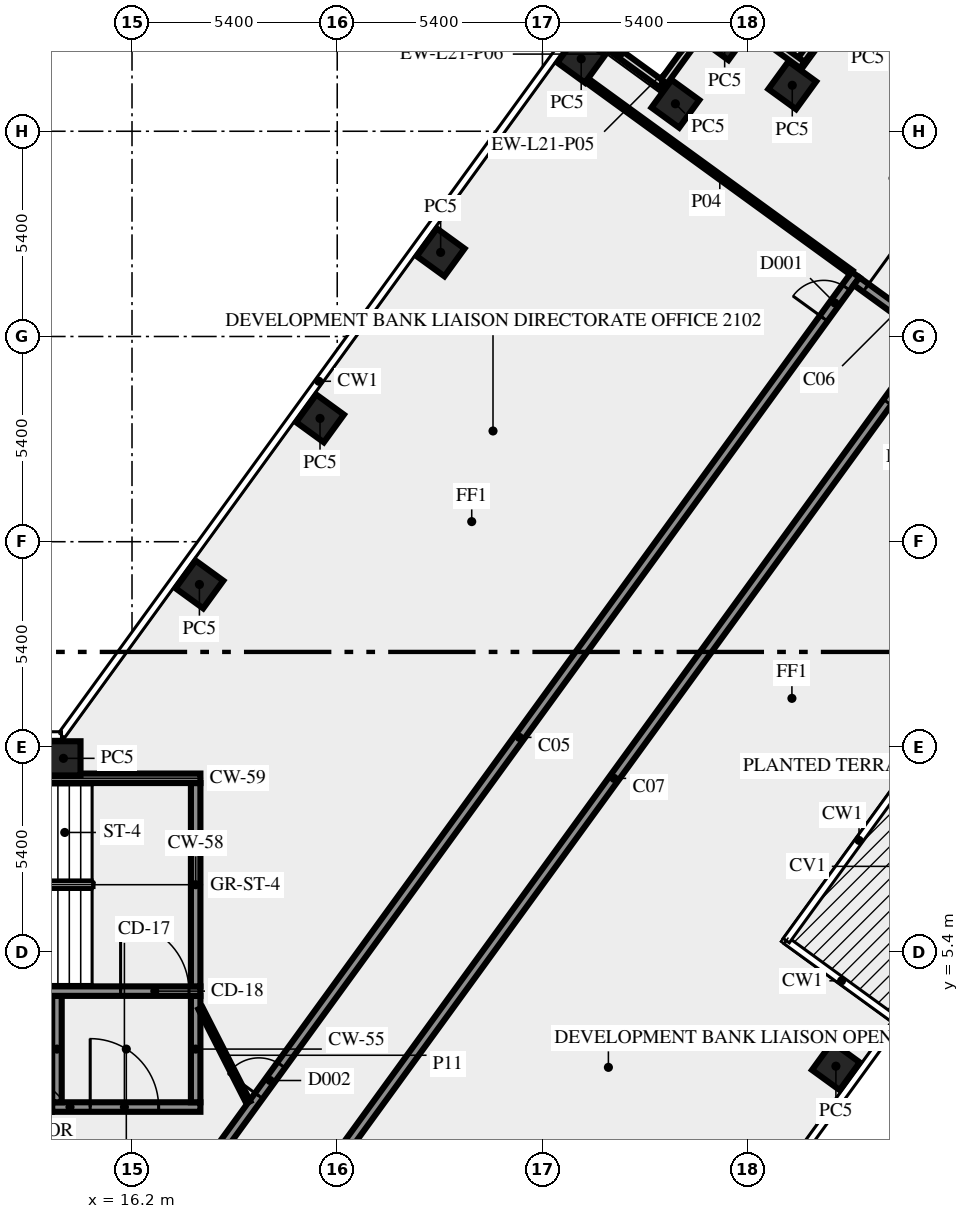
"""IFC4 building model, lengths in metres.
Left out: names, types, materials, properties, quantities, classifications, styles, units other than length and angle.
Written with IfcOpenShell. Run it as: python <this file> out.ifc"""

import sys

from ifc_helpers import new_model, si_unit, direction, frame, frame_2d, origin, origin_2d, place, context, subcontext, project, spatial, rectangle, extrude, element, fill, save


model = new_model("IFC4")
c1 = context("Model", 3, precision=1e-05, world=origin(), true_north=direction((0.0, 1.0)))
c2 = subcontext(c1, "Body", "Model", "MODEL_VIEW")
j1 = project(units=[si_unit("LENGTHUNIT", "METRE"), si_unit("PLANEANGLEUNIT", "RADIAN")], contexts=[c1])
p1 = place(None, origin())
s1 = spatial("IfcSite", under=j1, at=p1, CompositionType="ELEMENT")
p2 = place(p1, origin())
s2 = spatial("IfcBuilding", under=s1, at=p2, CompositionType="ELEMENT")
p3 = place(p2, frame((0.0, 0.0, 93.0)))
s3 = spatial("IfcBuildingStorey", under=s2, at=p3, CompositionType="ELEMENT", Elevation=93.0)
for number, where, z_axis, x_axis in (
    (1, (34.722, 2.4, 0.0), (0.0, 0.0, 1.0), (0.588, 0.809, 0.0)),
    (2, (33.574, 28.209, 0.0), (0.0, 0.0, 1.0), (-0.809, 0.588, 0.0)),
    (3, (31.795, 29.5, 0.0), (0.0, 0.0, 1.0), (-0.588, -0.809, 0.0)),
    (4, (30.499, 27.723, 0.0), (0.0, 0.0, 1.0), (-0.809, 0.588, 0.0)),
    (5, (28.02, 28.905, 0.0), (0.0, 0.0, 1.0), (-0.809, 0.588, 0.0)),
    (6, (24.321, 23.812, 0.0), (0.0, 0.0, 1.0), (-0.588, -0.809, 0.0)),
    (7, (21.147, 19.444, 0.0), (0.0, 0.0, 1.0), (-0.588, -0.809, 0.0)),
    (8, (17.974, 15.075, 0.0), (0.0, 0.0, 1.0), (-0.588, -0.809, 0.0)),
    (9, (14.395, 10.5, 0.0), (0.0, 0.0, 1.0), (-1.0, 0.0, 0.0)),
):
    element("IfcColumn", number, at=place(p3, frame(where, z_axis=z_axis, x_axis=x_axis)), inside=s3, PredefinedType="COLUMN", context=c2, shape_type="SweptSolid", body=[
        extrude(rectangle(XDim=0.9, YDim=0.9, at=origin_2d()), origin(), (0.0, 0.0, 1.0), 3.65),
    ])
for number, where, z_axis, x_axis in (
    (10, (35.351, 30.997, 0.0), (0.0, 0.0, 1.0), (-0.588, -0.809, 0.0)),
    (11, (33.838, 28.744, 0.0), (0.0, 0.0, 1.0), (-0.809, 0.588, 0.0)),
    (12, (31.67, 30.333, 0.0), (0.0, 0.0, 1.0), (-0.588, -0.809, 0.0)),
    (13, (30.133, 28.237, 0.0), (0.0, 0.0, 1.0), (-0.809, 0.588, 0.0)),
):
    element("IfcWall", number, at=place(p3, frame(where, z_axis=z_axis, x_axis=x_axis)), inside=s3, PredefinedType="SOLIDWALL", context=c2, shape_type="SweptSolid", body=[
        extrude(rectangle(XDim=2.7, YDim=0.2, at=frame_2d((1.35, 0.0))), origin(), (0.0, 0.0, 1.0), 3.65),
    ])
p4 = place(p3, frame((14.1, 1.325, 0.0), z_axis=(0.0, 0.0, 1.0), x_axis=(1.0, 0.0, 0.0)))
e14 = element("IfcWall", 14, at=p4, inside=s3, PredefinedType="SHEAR", context=c2, shape_type="SweptSolid", body=[
    extrude(rectangle(XDim=3.9, YDim=0.25, at=frame_2d((1.95, 0.0))), origin(), (0.0, 0.0, 1.0), 3.65),
])
p5 = place(p4, frame((1.0, 0.0, 0.0)))
e15 = element("IfcOpeningElement", 15, at=p5, cuts=e14, PredefinedType="OPENING", context=c2, shape_type="SweptSolid", body=[
    extrude(rectangle(XDim=1.8, YDim=2.1, at=frame_2d((0.9, 1.05))), frame((0.0, 0.135, 0.0), z_axis=(0.0, -1.0, 0.0), x_axis=(1.0, 0.0, 0.0)), (0.0, 0.0, 1.0), 0.27),
])
for number, where, z_axis, x_axis in (
    (16, (14.225, 1.45, 0.0), (0.0, 0.0, 1.0), (0.0, 1.0, 0.0)),
    (17, (17.875, 1.45, 0.0), (0.0, 0.0, 1.0), (0.0, 1.0, 0.0)),
):
    element("IfcWall", number, at=place(p3, frame(where, z_axis=z_axis, x_axis=x_axis)), inside=s3, PredefinedType="SHEAR", context=c2, shape_type="SweptSolid", body=[
        extrude(rectangle(XDim=2.8, YDim=0.25, at=frame_2d((1.4, 0.0))), origin(), (0.0, 0.0, 1.0), 3.65),
    ])
p6 = place(p3, frame((7.5, 4.375, 0.0), z_axis=(0.0, 0.0, 1.0), x_axis=(1.0, 0.0, 0.0)))
e18 = element("IfcWall", 18, at=p6, inside=s3, PredefinedType="SHEAR", context=c2, shape_type="SweptSolid", body=[
    extrude(rectangle(XDim=10.5, YDim=0.25, at=frame_2d((5.25, 0.0))), origin(), (0.0, 0.0, 1.0), 3.65),
])
p7 = place(p6, frame((8.4, 0.0, 0.0)))
e19 = element("IfcOpeningElement", 19, at=p7, cuts=e18, PredefinedType="OPENING", context=c2, shape_type="SweptSolid", body=[
    extrude(rectangle(XDim=1.8, YDim=2.1, at=frame_2d((0.9, 1.05))), frame((0.0, 0.135, 0.0), z_axis=(0.0, -1.0, 0.0), x_axis=(1.0, 0.0, 0.0)), (0.0, 0.0, 1.0), 0.27),
])
p8 = place(p3, frame((17.875, 4.5, 0.0), z_axis=(0.0, 0.0, 1.0), x_axis=(0.0, 1.0, 0.0)))
e20 = element("IfcWall", 20, at=p8, inside=s3, PredefinedType="SHEAR", context=c2, shape_type="SweptSolid", body=[
    extrude(rectangle(XDim=5.35, YDim=0.25, at=frame_2d((2.675, 0.0))), origin(), (0.0, 0.0, 1.0), 3.65),
])
p9 = place(p3, frame((7.5, 9.975, 0.0), z_axis=(0.0, 0.0, 1.0), x_axis=(1.0, 0.0, 0.0)))
e21 = element("IfcWall", 21, at=p9, inside=s3, PredefinedType="SHEAR", context=c2, shape_type="SweptSolid", body=[
    extrude(rectangle(XDim=10.5, YDim=0.25, at=frame_2d((5.25, 0.0))), origin(), (0.0, 0.0, 1.0), 3.65),
])
p10 = place(p9, frame((2.0, 0.0, 1.0)))
e22 = element("IfcOpeningElement", 22, at=p10, cuts=e21, PredefinedType="OPENING", context=c2, shape_type="SweptSolid", body=[
    extrude(rectangle(XDim=1.2, YDim=1.2, at=frame_2d((0.6, 0.6))), frame((0.0, 0.135, 0.0), z_axis=(0.0, -1.0, 0.0), x_axis=(1.0, 0.0, 0.0)), (0.0, 0.0, 1.0), 0.27),
])
p11 = place(p3, frame((17.545, -1.125, 0.0), z_axis=(0.0, 0.0, 1.0), x_axis=(0.587786330937, 0.809016210693, 0.0)))
e23 = element("IfcWall", 23, at=p11, inside=s3, PredefinedType="SOLIDWALL", context=c2, shape_type="SweptSolid", body=[
    extrude(rectangle(XDim=30.103, YDim=0.25, at=frame_2d((15.052, 0.0))), origin(), (0.0, 0.0, 1.0), 3.65),
])
p12 = place(p11, frame((28.679, 0.0, 0.0)))
e24 = element("IfcOpeningElement", 24, at=p12, cuts=e23, PredefinedType="OPENING", context=c2, shape_type="SweptSolid", body=[
    extrude(rectangle(XDim=1.0, YDim=2.1, at=frame_2d((0.5, 1.05))), frame((0.0, 0.135, 0.0), z_axis=(0.0, -1.0, 0.0), x_axis=(1.0, 0.0, 0.0)), (0.0, 0.0, 1.0), 0.27),
])
p13 = place(p11, frame((3.391, 0.0, 0.0)))
e25 = element("IfcOpeningElement", 25, at=p13, cuts=e23, PredefinedType="OPENING", context=c2, shape_type="SweptSolid", body=[
    extrude(rectangle(XDim=1.0, YDim=2.1, at=frame_2d((0.5, 1.05))), frame((0.0, 0.135, 0.0), z_axis=(0.0, -1.0, 0.0), x_axis=(1.0, 0.0, 0.0)), (0.0, 0.0, 1.0), 0.27),
])
p14 = place(p3, frame((35.267, 23.054, 0.0), z_axis=(0.0, 0.0, 1.0), x_axis=(0.809038743598, -0.587755315891, 0.0)))
e26 = element("IfcWall", 26, at=p14, inside=s3, PredefinedType="SOLIDWALL", context=c2, shape_type="SweptSolid", body=[
    extrude(rectangle(XDim=2.65, YDim=0.25, at=frame_2d((1.325, 0.0))), origin(), (0.0, 0.0, 1.0), 3.65),
])
p15 = place(p14, frame((0.3, 0.0, 0.0)))
e27 = element("IfcOpeningElement", 27, at=p15, cuts=e26, PredefinedType="OPENING", context=c2, shape_type="SweptSolid", body=[
    extrude(rectangle(XDim=1.8, YDim=2.1, at=frame_2d((0.9, 1.05))), frame((0.0, 0.135, 0.0), z_axis=(0.0, -1.0, 0.0), x_axis=(1.0, 0.0, 0.0)), (0.0, 0.0, 1.0), 0.27),
])
p16 = place(p3, frame((37.236, 21.469, 0.0), z_axis=(0.0, 0.0, 1.0), x_axis=(-0.58778344073, -0.809018310549, 0.0)))
e28 = element("IfcWall", 28, at=p16, inside=s3, PredefinedType="SOLIDWALL", context=c2, shape_type="SweptSolid", body=[
    extrude(rectangle(XDim=28.42, YDim=0.25, at=frame_2d((14.21, 0.0))), origin(), (0.0, 0.0, 1.0), 3.65),
])
p17 = place(p16, frame((26.137, 0.0, 0.0)))
e29 = element("IfcOpeningElement", 29, at=p17, cuts=e28, PredefinedType="OPENING", context=c2, shape_type="SweptSolid", body=[
    extrude(rectangle(XDim=1.8, YDim=2.1, at=frame_2d((0.9, 1.05))), frame((0.0, 0.135, 0.0), z_axis=(0.0, -1.0, 0.0), x_axis=(1.0, 0.0, 0.0)), (0.0, 0.0, 1.0), 0.27),
])
p18 = place(p16, frame((0.175, 0.0, 0.0)))
e30 = element("IfcOpeningElement", 30, at=p18, cuts=e28, PredefinedType="OPENING", context=c2, shape_type="SweptSolid", body=[
    extrude(rectangle(XDim=1.8, YDim=2.1, at=frame_2d((0.9, 1.05))), frame((0.0, 0.135, 0.0), z_axis=(0.0, -1.0, 0.0), x_axis=(1.0, 0.0, 0.0)), (0.0, 0.0, 1.0), 0.27),
])
p19 = place(p3, frame((35.126, 23.286, 0.0), z_axis=(0.0, 0.0, 1.0), x_axis=(-0.809022465264, 0.587777722186, 0.0)))
e31 = element("IfcWall", 31, at=p19, inside=s3, PredefinedType="PARTITIONING", context=c2, shape_type="SweptSolid", body=[
    extrude(rectangle(XDim=8.55, YDim=0.12, at=frame_2d((4.275, 0.0))), origin(), (0.0, 0.0, 1.0), 3.65),
])
p20 = place(p3, frame((18.0, 3.925, 0.0), z_axis=(0.0, 0.0, 1.0), x_axis=(0.453950796792, -0.891026752736, 0.0)))
e32 = element("IfcWall", 32, at=p20, inside=s3, PredefinedType="PARTITIONING", context=c2, shape_type="SweptSolid", body=[
    extrude(rectangle(XDim=2.778, YDim=0.12, at=frame_2d((1.389, 0.0))), origin(), (0.0, 0.0, 1.0), 3.65),
])
p21 = place(p5, origin())
e33 = element("IfcDoor", 33, at=p21, inside=s3, OperationType="DOUBLE_DOOR_SINGLE_SWING", PredefinedType="DOOR", context=c2, shape_type="SweptSolid", body=[
    extrude(rectangle(XDim=1.8, YDim=2.1, at=frame_2d((0.9, 1.05))), frame((0.0, 0.025, 0.0), z_axis=(0.0, -1.0, 0.0), x_axis=(1.0, 0.0, 0.0)), (0.0, 0.0, 1.0), 0.05),
])
fill(e15, e33)
p22 = place(p7, origin())
e34 = element("IfcDoor", 34, at=p22, inside=s3, OperationType="DOUBLE_DOOR_SINGLE_SWING", PredefinedType="DOOR", context=c2, shape_type="SweptSolid", body=[
    extrude(rectangle(XDim=1.8, YDim=2.1, at=frame_2d((0.9, 1.05))), frame((0.0, 0.025, 0.0), z_axis=(0.0, -1.0, 0.0), x_axis=(1.0, 0.0, 0.0)), (0.0, 0.0, 1.0), 0.05),
])
fill(e19, e34)
p23 = place(p12, origin())
e35 = element("IfcDoor", 35, at=p23, inside=s3, OperationType="SINGLE_SWING_RIGHT", PredefinedType="DOOR", context=c2, shape_type="SweptSolid", body=[
    extrude(rectangle(XDim=1.0, YDim=2.1, at=frame_2d((0.5, 1.05))), frame((0.0, 0.025, 0.0), z_axis=(0.0, -1.0, 0.0), x_axis=(1.0, 0.0, 0.0)), (0.0, 0.0, 1.0), 0.05),
])
fill(e24, e35)
p24 = place(p13, origin())
e36 = element("IfcDoor", 36, at=p24, inside=s3, OperationType="SINGLE_SWING_LEFT", PredefinedType="DOOR", context=c2, shape_type="SweptSolid", body=[
    extrude(rectangle(XDim=1.0, YDim=2.1, at=frame_2d((0.5, 1.05))), frame((0.0, 0.025, 0.0), z_axis=(0.0, -1.0, 0.0), x_axis=(1.0, 0.0, 0.0)), (0.0, 0.0, 1.0), 0.05),
])
fill(e25, e36)
p25 = place(p18, origin())
e37 = element("IfcDoor", 37, at=p25, inside=s3, OperationType="DOUBLE_DOOR_SINGLE_SWING", PredefinedType="DOOR", context=c2, shape_type="SweptSolid", body=[
    extrude(rectangle(XDim=1.8, YDim=2.1, at=frame_2d((0.9, 1.05))), frame((0.0, 0.025, 0.0), z_axis=(0.0, -1.0, 0.0), x_axis=(1.0, 0.0, 0.0)), (0.0, 0.0, 1.0), 0.05),
])
fill(e30, e37)
p26 = place(p15, origin())
e38 = element("IfcDoor", 38, at=p26, inside=s3, OperationType="DOUBLE_DOOR_SINGLE_SWING", PredefinedType="DOOR", context=c2, shape_type="SweptSolid", body=[
    extrude(rectangle(XDim=1.8, YDim=2.1, at=frame_2d((0.9, 1.05))), frame((0.0, 0.025, 0.0), z_axis=(0.0, -1.0, 0.0), x_axis=(1.0, 0.0, 0.0)), (0.0, 0.0, 1.0), 0.05),
])
fill(e27, e38)
save(model, sys.argv[1])
